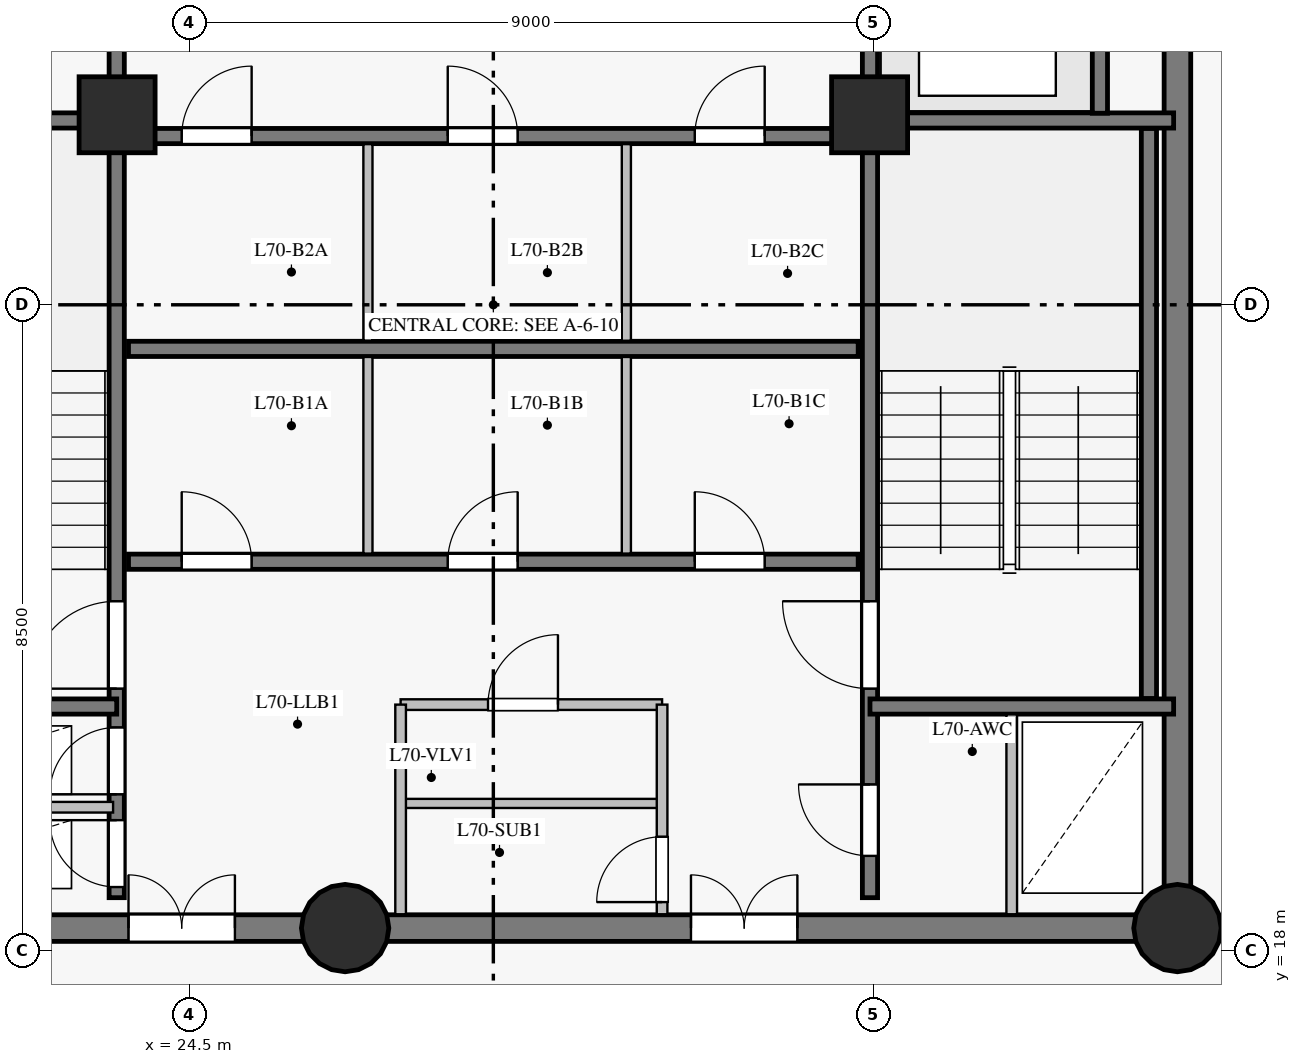
"""IFC4 building model, lengths in metres.
Left out: names, types, materials, properties, quantities, classifications, styles, units other than length and angle.
Written with IfcOpenShell. Run it as: python <this file> out.ifc"""

import sys

from ifc_helpers import new_model, si_unit, direction, frame, frame_2d, origin, origin_with_axes, origin_2d, place, context, subcontext, project, spatial, rectangle, circle, extrude, source, transform, mapped, element, fill, save


model = new_model("IFC4")
c1 = context("Model", 3, precision=1e-05, world=origin(), true_north=direction((0.0, 1.0)))
c2 = subcontext(c1, "Body", "Model", "MODEL_VIEW")
j1 = project(units=[si_unit("LENGTHUNIT", "METRE"), si_unit("PLANEANGLEUNIT", "RADIAN")], contexts=[c1])
p1 = place(None, origin())
s1 = spatial("IfcSite", under=j1, at=p1, CompositionType="ELEMENT")
p2 = place(p1, origin())
s2 = spatial("IfcBuilding", under=s1, at=p2, CompositionType="ELEMENT")
p3 = place(p2, frame((0.0, 0.0, 238.25)))
s3 = spatial("IfcBuildingStorey", under=s2, at=p3, CompositionType="ELEMENT", Elevation=238.25)
p4 = place(p3, frame((19.5, 18.3, 0.0), z_axis=(0.0, 0.0, 1.0), x_axis=(1.0, 0.0, 0.0)))
e1 = element("IfcWall", 1, at=p4, inside=s3, PredefinedType="SHEAR", context=c2, shape_type="SweptSolid", body=[
    extrude(rectangle(XDim=7.05, YDim=0.35, at=frame_2d((3.525, 0.0))), origin(), (0.0, 0.0, 1.0), 2.85),
])
p5 = place(p4, frame((4.2, 0.0, 0.0)))
e2 = element("IfcOpeningElement", 2, at=p5, cuts=e1, PredefinedType="OPENING", context=c2, shape_type="SweptSolid", body=[
    extrude(rectangle(XDim=1.4, YDim=2.2, at=frame_2d((0.7, 1.1))), frame((0.0, 0.185, 0.0), z_axis=(0.0, -1.0, 0.0), x_axis=(1.0, 0.0, 0.0)), (0.0, 0.0, 1.0), 0.37),
])
p6 = place(p3, frame((26.55, 18.3, 0.0), z_axis=(0.0, 0.0, 1.0), x_axis=(1.0, 0.0, 0.0)))
e3 = element("IfcWall", 3, at=p6, inside=s3, PredefinedType="SHEAR", context=c2, shape_type="SweptSolid", body=[
    extrude(rectangle(XDim=10.95, YDim=0.35, at=frame_2d((5.475, 0.0))), origin(), (0.0, 0.0, 1.0), 2.85),
])
p7 = place(p6, frame((4.55, 0.0, 0.0)))
e4 = element("IfcOpeningElement", 4, at=p7, cuts=e3, PredefinedType="OPENING", context=c2, shape_type="SweptSolid", body=[
    extrude(rectangle(XDim=1.4, YDim=2.2, at=frame_2d((0.7, 1.1))), frame((0.0, 0.185, 0.0), z_axis=(0.0, -1.0, 0.0), x_axis=(1.0, 0.0, 0.0)), (0.0, 0.0, 1.0), 0.37),
])
p8 = place(p3, frame((37.5, 18.3, 0.0), z_axis=(0.0, 0.0, 1.0), x_axis=(0.0, 1.0, 0.0)))
e5 = element("IfcWall", 5, at=p8, inside=s3, PredefinedType="SHEAR", context=c2, shape_type="SweptSolid", body=[
    extrude(rectangle(XDim=16.4, YDim=0.35, at=frame_2d((8.2, 0.0))), origin(), (0.0, 0.0, 1.0), 2.85),
])
p9 = place(p8, frame((13.85, 0.0, 0.0)))
e6 = element("IfcOpeningElement", 6, at=p9, cuts=e5, PredefinedType="OPENING", context=c2, shape_type="SweptSolid", body=[
    extrude(rectangle(XDim=1.2, YDim=2.15, at=frame_2d((0.6, 1.075))), frame((0.0, 0.185, 0.0), z_axis=(0.0, -1.0, 0.0), x_axis=(1.0, 0.0, 0.0)), (0.0, 0.0, 1.0), 0.37),
])
m1 = source(origin_with_axes(), c2, "Body", "SweptSolid", [
    extrude(circle(Radius=0.575, at=origin_2d()), origin(), (0.0, 0.0, 1.0), 3.05),
])
for number, where, z_axis, x_axis in (
    (7, (26.55, 18.3, 0.0), (0.0, 0.0, 1.0), (1.0, 0.0, 0.0)),
    (8, (37.5, 18.3, 0.0), (0.0, 0.0, 1.0), (1.0, 0.0, 0.0)),
):
    element("IfcColumn", number, at=place(p3, frame(where, z_axis=z_axis, x_axis=x_axis)), inside=s3, PredefinedType="COLUMN", context=c2, shape_type="MappedRepresentation", body=[
        mapped(m1, transform((0.0, 0.0, 0.0), scale=1.0)),
    ])
m2 = source(origin_with_axes(), c2, "Body", "SweptSolid", [
    extrude(rectangle(XDim=1.0, YDim=1.0, at=origin_2d()), origin(), (0.0, 0.0, 1.0), 3.05),
])
for number, where, z_axis, x_axis in (
    (9, (23.55, 29.0, 0.0), (0.0, 0.0, 1.0), (1.0, 0.0, 0.0)),
    (10, (33.45, 29.0, 0.0), (0.0, 0.0, 1.0), (1.0, 0.0, 0.0)),
):
    element("IfcColumn", number, at=place(p3, frame(where, z_axis=z_axis, x_axis=x_axis)), inside=s3, PredefinedType="COLUMN", context=c2, shape_type="MappedRepresentation", body=[
        mapped(m2, transform((0.0, 0.0, 0.0), scale=1.0)),
    ])
p10 = place(p3, frame((23.545, 18.7, 0.0), z_axis=(0.0, 0.0, 1.0), x_axis=(0.0, 1.0, 0.0)))
e11 = element("IfcWall", 11, at=p10, inside=s3, PredefinedType="SHEAR", context=c2, shape_type="SweptSolid", body=[
    extrude(rectangle(XDim=15.6, YDim=0.2, at=frame_2d((7.8, 0.0))), origin(), (0.0, 0.0, 1.0), 2.85),
])
p11 = place(p10, frame((2.75, 0.0, 0.0)))
e12 = element("IfcOpeningElement", 12, at=p11, cuts=e11, PredefinedType="OPENING", context=c2, shape_type="SweptSolid", body=[
    extrude(rectangle(XDim=1.15, YDim=2.15, at=frame_2d((0.575, 1.075))), frame((0.0, 0.11, 0.0), z_axis=(0.0, -1.0, 0.0), x_axis=(1.0, 0.0, 0.0)), (0.0, 0.0, 1.0), 0.22),
])
p12 = place(p10, frame((0.14, 0.0, 0.0)))
e13 = element("IfcOpeningElement", 13, at=p12, cuts=e11, PredefinedType="OPENING", context=c2, shape_type="SweptSolid", body=[
    extrude(rectangle(XDim=0.88, YDim=2.1, at=frame_2d((0.44, 1.05))), frame((0.0, 0.11, 0.0), z_axis=(0.0, -1.0, 0.0), x_axis=(1.0, 0.0, 0.0)), (0.0, 0.0, 1.0), 0.22),
])
p13 = place(p10, frame((1.36, 0.0, 0.0)))
e14 = element("IfcOpeningElement", 14, at=p13, cuts=e11, PredefinedType="OPENING", context=c2, shape_type="SweptSolid", body=[
    extrude(rectangle(XDim=0.88, YDim=2.1, at=frame_2d((0.44, 1.05))), frame((0.0, 0.11, 0.0), z_axis=(0.0, -1.0, 0.0), x_axis=(1.0, 0.0, 0.0)), (0.0, 0.0, 1.0), 0.22),
])
p14 = place(p10, frame((12.1, 0.0, 0.0)))
e15 = element("IfcOpeningElement", 15, at=p14, cuts=e11, PredefinedType="OPENING", context=c2, shape_type="SweptSolid", body=[
    extrude(rectangle(XDim=1.12, YDim=2.15, at=frame_2d((0.56, 1.075))), frame((0.0, 0.11, 0.0), z_axis=(0.0, -1.0, 0.0), x_axis=(1.0, 0.0, 0.0)), (0.0, 0.0, 1.0), 0.22),
])
p15 = place(p10, frame((14.05, 0.0, 0.0)))
e16 = element("IfcOpeningElement", 16, at=p15, cuts=e11, PredefinedType="OPENING", context=c2, shape_type="SweptSolid", body=[
    extrude(rectangle(XDim=1.12, YDim=2.15, at=frame_2d((0.56, 1.075))), frame((0.0, 0.11, 0.0), z_axis=(0.0, -1.0, 0.0), x_axis=(1.0, 0.0, 0.0)), (0.0, 0.0, 1.0), 0.22),
])
p16 = place(p3, frame((33.455, 18.7, 0.0), z_axis=(0.0, 0.0, 1.0), x_axis=(0.0, 1.0, 0.0)))
e17 = element("IfcWall", 17, at=p16, inside=s3, PredefinedType="SHEAR", context=c2, shape_type="SweptSolid", body=[
    extrude(rectangle(XDim=15.6, YDim=0.2, at=frame_2d((7.8, 0.0))), origin(), (0.0, 0.0, 1.0), 2.85),
])
p17 = place(p16, frame((2.75, 0.0, 0.0)))
e18 = element("IfcOpeningElement", 18, at=p17, cuts=e17, PredefinedType="OPENING", context=c2, shape_type="SweptSolid", body=[
    extrude(rectangle(XDim=1.15, YDim=2.15, at=frame_2d((0.575, 1.075))), frame((0.0, 0.11, 0.0), z_axis=(0.0, -1.0, 0.0), x_axis=(1.0, 0.0, 0.0)), (0.0, 0.0, 1.0), 0.22),
])
p18 = place(p16, frame((0.55, 0.0, 0.0)))
e19 = element("IfcOpeningElement", 19, at=p18, cuts=e17, PredefinedType="OPENING", context=c2, shape_type="SweptSolid", body=[
    extrude(rectangle(XDim=0.94, YDim=2.1, at=frame_2d((0.47, 1.05))), frame((0.0, 0.11, 0.0), z_axis=(0.0, -1.0, 0.0), x_axis=(1.0, 0.0, 0.0)), (0.0, 0.0, 1.0), 0.22),
])
p19 = place(p3, frame((23.7, 23.12, 0.0), z_axis=(0.0, 0.0, 1.0), x_axis=(1.0, 0.0, 0.0)))
e20 = element("IfcWall", 20, at=p19, inside=s3, PredefinedType="SHEAR", context=c2, shape_type="SweptSolid", body=[
    extrude(rectangle(XDim=9.6, YDim=0.2, at=frame_2d((4.8, 0.0))), origin(), (0.0, 0.0, 1.0), 2.85),
])
p20 = place(p19, frame((0.7, 0.0, 0.0)))
e21 = element("IfcOpeningElement", 21, at=p20, cuts=e20, PredefinedType="OPENING", context=c2, shape_type="SweptSolid", body=[
    extrude(rectangle(XDim=0.92, YDim=2.1, at=frame_2d((0.46, 1.05))), frame((0.0, 0.11, 0.0), z_axis=(0.0, -1.0, 0.0), x_axis=(1.0, 0.0, 0.0)), (0.0, 0.0, 1.0), 0.22),
])
p21 = place(p19, frame((4.2, 0.0, 0.0)))
e22 = element("IfcOpeningElement", 22, at=p21, cuts=e20, PredefinedType="OPENING", context=c2, shape_type="SweptSolid", body=[
    extrude(rectangle(XDim=0.92, YDim=2.1, at=frame_2d((0.46, 1.05))), frame((0.0, 0.11, 0.0), z_axis=(0.0, -1.0, 0.0), x_axis=(1.0, 0.0, 0.0)), (0.0, 0.0, 1.0), 0.22),
])
p22 = place(p19, frame((7.45, 0.0, 0.0)))
e23 = element("IfcOpeningElement", 23, at=p22, cuts=e20, PredefinedType="OPENING", context=c2, shape_type="SweptSolid", body=[
    extrude(rectangle(XDim=0.92, YDim=2.1, at=frame_2d((0.46, 1.05))), frame((0.0, 0.11, 0.0), z_axis=(0.0, -1.0, 0.0), x_axis=(1.0, 0.0, 0.0)), (0.0, 0.0, 1.0), 0.22),
])
p23 = place(p3, frame((23.7, 25.92, 0.0), z_axis=(0.0, 0.0, 1.0), x_axis=(1.0, 0.0, 0.0)))
e24 = element("IfcWall", 24, at=p23, inside=s3, PredefinedType="SHEAR", context=c2, shape_type="SweptSolid", body=[
    extrude(rectangle(XDim=9.6, YDim=0.2, at=frame_2d((4.8, 0.0))), origin(), (0.0, 0.0, 1.0), 2.85),
])
p24 = place(p3, frame((23.7, 28.72, 0.0), z_axis=(0.0, 0.0, 1.0), x_axis=(1.0, 0.0, 0.0)))
e25 = element("IfcWall", 25, at=p24, inside=s3, PredefinedType="SHEAR", context=c2, shape_type="SweptSolid", body=[
    extrude(rectangle(XDim=9.6, YDim=0.2, at=frame_2d((4.8, 0.0))), origin(), (0.0, 0.0, 1.0), 2.85),
])
p25 = place(p24, frame((0.7, 0.0, 0.0)))
e26 = element("IfcOpeningElement", 26, at=p25, cuts=e25, PredefinedType="OPENING", context=c2, shape_type="SweptSolid", body=[
    extrude(rectangle(XDim=0.92, YDim=2.1, at=frame_2d((0.46, 1.05))), frame((0.0, 0.11, 0.0), z_axis=(0.0, -1.0, 0.0), x_axis=(1.0, 0.0, 0.0)), (0.0, 0.0, 1.0), 0.22),
])
p26 = place(p24, frame((4.2, 0.0, 0.0)))
e27 = element("IfcOpeningElement", 27, at=p26, cuts=e25, PredefinedType="OPENING", context=c2, shape_type="SweptSolid", body=[
    extrude(rectangle(XDim=0.92, YDim=2.1, at=frame_2d((0.46, 1.05))), frame((0.0, 0.11, 0.0), z_axis=(0.0, -1.0, 0.0), x_axis=(1.0, 0.0, 0.0)), (0.0, 0.0, 1.0), 0.22),
])
p27 = place(p24, frame((7.45, 0.0, 0.0)))
e28 = element("IfcOpeningElement", 28, at=p27, cuts=e25, PredefinedType="OPENING", context=c2, shape_type="SweptSolid", body=[
    extrude(rectangle(XDim=0.92, YDim=2.1, at=frame_2d((0.46, 1.05))), frame((0.0, 0.11, 0.0), z_axis=(0.0, -1.0, 0.0), x_axis=(1.0, 0.0, 0.0)), (0.0, 0.0, 1.0), 0.22),
])
p28 = place(p3, frame((37.125, 21.32, 0.0), z_axis=(0.0, 0.0, 1.0), x_axis=(0.0, 1.0, 0.0)))
e29 = element("IfcWall", 29, at=p28, inside=s3, PredefinedType="SHEAR", context=c2, shape_type="SweptSolid", body=[
    extrude(rectangle(XDim=7.5, YDim=0.2, at=frame_2d((3.75, 0.0))), origin(), (0.0, 0.0, 1.0), 2.85),
])
for number, where, z_axis, x_axis in (
    (30, (33.455, 21.215, 0.0), (0.0, 0.0, 1.0), (1.0, 0.0, 0.0)),
    (31, (33.455, 28.925, 0.0), (0.0, 0.0, 1.0), (1.0, 0.0, 0.0)),
    (32, (19.55, 21.215, 0.0), (0.0, 0.0, 1.0), (1.0, 0.0, 0.0)),
    (33, (19.55, 28.925, 0.0), (0.0, 0.0, 1.0), (1.0, 0.0, 0.0)),
):
    element("IfcWall", number, at=place(p3, frame(where, z_axis=z_axis, x_axis=x_axis)), inside=s3, PredefinedType="SHEAR", context=c2, shape_type="SweptSolid", body=[
        extrude(rectangle(XDim=3.995, YDim=0.2, at=frame_2d((1.998, 0.0))), origin(), (0.0, 0.0, 1.0), 2.85),
    ])
p29 = place(p3, frame((36.48, 29.02, 0.0), z_axis=(0.0, 0.0, 1.0), x_axis=(0.0, 1.0, 0.0)))
e34 = element("IfcWall", 34, at=p29, inside=s3, PredefinedType="SHEAR", context=c2, shape_type="SweptSolid", body=[
    extrude(rectangle(XDim=2.86, YDim=0.2, at=frame_2d((1.43, 0.0))), origin(), (0.0, 0.0, 1.0), 2.85),
])
p30 = place(p3, frame((19.682, 19.89, 0.0), z_axis=(0.0, 0.0, 1.0), x_axis=(1.0, 0.0, 0.0)))
e35 = element("IfcWall", 35, at=p30, inside=s3, PredefinedType="PARTITIONING", context=c2, shape_type="SweptSolid", body=[
    extrude(rectangle(XDim=3.815, YDim=0.14, at=frame_2d((1.908, 0.0))), origin(), (0.0, 0.0, 1.0), 2.85),
])
p31 = place(p3, frame((27.28, 21.24, 0.0), z_axis=(0.0, 0.0, 1.0), x_axis=(1.0, 0.0, 0.0)))
e36 = element("IfcWall", 36, at=p31, inside=s3, PredefinedType="PARTITIONING", context=c2, shape_type="SweptSolid", body=[
    extrude(rectangle(XDim=3.44, YDim=0.14, at=frame_2d((1.72, 0.0))), origin(), (0.0, 0.0, 1.0), 2.85),
])
p32 = place(p31, frame((1.15, 0.0, 0.0)))
e37 = element("IfcOpeningElement", 37, at=p32, cuts=e36, PredefinedType="OPENING", context=c2, shape_type="SweptSolid", body=[
    extrude(rectangle(XDim=0.92, YDim=2.1, at=frame_2d((0.46, 1.05))), frame((0.0, 0.08, 0.0), z_axis=(0.0, -1.0, 0.0), x_axis=(1.0, 0.0, 0.0)), (0.0, 0.0, 1.0), 0.16),
])
p33 = place(p3, frame((27.28, 19.94, 0.0), z_axis=(0.0, 0.0, 1.0), x_axis=(1.0, 0.0, 0.0)))
e38 = element("IfcWall", 38, at=p33, inside=s3, PredefinedType="PARTITIONING", context=c2, shape_type="SweptSolid", body=[
    extrude(rectangle(XDim=3.44, YDim=0.12, at=frame_2d((1.72, 0.0))), origin(), (0.0, 0.0, 1.0), 2.85),
])
p34 = place(p3, frame((27.28, 18.482, 0.0), z_axis=(0.0, 0.0, 1.0), x_axis=(0.0, 1.0, 0.0)))
e39 = element("IfcWall", 39, at=p34, inside=s3, PredefinedType="PARTITIONING", context=c2, shape_type="SweptSolid", body=[
    extrude(rectangle(XDim=2.758, YDim=0.14, at=frame_2d((1.379, 0.0))), origin(), (0.0, 0.0, 1.0), 2.85),
])
p35 = place(p3, frame((30.72, 18.482, 0.0), z_axis=(0.0, 0.0, 1.0), x_axis=(0.0, 1.0, 0.0)))
e40 = element("IfcWall", 40, at=p35, inside=s3, PredefinedType="PARTITIONING", context=c2, shape_type="SweptSolid", body=[
    extrude(rectangle(XDim=2.758, YDim=0.14, at=frame_2d((1.379, 0.0))), origin(), (0.0, 0.0, 1.0), 2.85),
])
p36 = place(p35, frame((0.16, 0.0, 0.0)))
e41 = element("IfcOpeningElement", 41, at=p36, cuts=e40, PredefinedType="OPENING", context=c2, shape_type="SweptSolid", body=[
    extrude(rectangle(XDim=0.86, YDim=2.1, at=frame_2d((0.43, 1.05))), frame((0.0, 0.08, 0.0), z_axis=(0.0, -1.0, 0.0), x_axis=(1.0, 0.0, 0.0)), (0.0, 0.0, 1.0), 0.16),
])
for number, where, z_axis, x_axis in (
    (42, (26.85, 23.227, 0.0), (0.0, 0.0, 1.0), (0.0, 1.0, 0.0)),
    (43, (30.25, 23.227, 0.0), (0.0, 0.0, 1.0), (0.0, 1.0, 0.0)),
    (44, (26.85, 26.027, 0.0), (0.0, 0.0, 1.0), (0.0, 1.0, 0.0)),
    (45, (30.25, 26.027, 0.0), (0.0, 0.0, 1.0), (0.0, 1.0, 0.0)),
):
    element("IfcWall", number, at=place(p3, frame(where, z_axis=z_axis, x_axis=x_axis)), inside=s3, PredefinedType="PARTITIONING", context=c2, shape_type="SweptSolid", body=[
        extrude(rectangle(XDim=2.587, YDim=0.12, at=frame_2d((1.293, 0.0))), origin(), (0.0, 0.0, 1.0), 2.85),
    ])
p37 = place(p3, frame((35.32, 18.482, 0.0), z_axis=(0.0, 0.0, 1.0), x_axis=(0.0, 1.0, 0.0)))
e46 = element("IfcWall", 46, at=p37, inside=s3, PredefinedType="PARTITIONING", context=c2, shape_type="SweptSolid", body=[
    extrude(rectangle(XDim=2.629, YDim=0.14, at=frame_2d((1.314, 0.0))), origin(), (0.0, 0.0, 1.0), 2.85),
])
m3 = source(origin_with_axes(), c2, "Body", "SweptSolid", [
    extrude(rectangle(XDim=1.15, YDim=2.15, at=frame_2d((0.575, 1.075))), frame((0.0, 0.025, 0.0), z_axis=(0.0, -1.0, 0.0), x_axis=(1.0, 0.0, 0.0)), (0.0, 0.0, 1.0), 0.05),
])
p38 = place(p11, origin())
e47 = element("IfcDoor", 47, at=p38, inside=s3, OperationType="SINGLE_SWING_LEFT", PredefinedType="DOOR", context=c2, shape_type="MappedRepresentation", body=[
    mapped(m3, transform((0.0, 0.0, 0.0), scale=1.0)),
])
fill(e12, e47)
p39 = place(p17, origin())
e48 = element("IfcDoor", 48, at=p39, inside=s3, OperationType="SINGLE_SWING_RIGHT", PredefinedType="DOOR", context=c2, shape_type="MappedRepresentation", body=[
    mapped(m3, transform((0.0, 0.0, 0.0), scale=1.0)),
])
fill(e18, e48)
m4 = source(origin_with_axes(), c2, "Body", "SweptSolid", [
    extrude(rectangle(XDim=0.88, YDim=2.1, at=frame_2d((0.44, 1.05))), frame((0.0, 0.025, 0.0), z_axis=(0.0, -1.0, 0.0), x_axis=(1.0, 0.0, 0.0)), (0.0, 0.0, 1.0), 0.05),
])
p40 = place(p12, origin())
e49 = element("IfcDoor", 49, at=p40, inside=s3, OperationType="SINGLE_SWING_RIGHT", PredefinedType="DOOR", context=c2, shape_type="MappedRepresentation", body=[
    mapped(m4, transform((0.0, 0.0, 0.0), scale=1.0)),
])
fill(e13, e49)
p41 = place(p13, origin())
e50 = element("IfcDoor", 50, at=p41, inside=s3, OperationType="SINGLE_SWING_LEFT", PredefinedType="DOOR", context=c2, shape_type="MappedRepresentation", body=[
    mapped(m4, transform((0.0, 0.0, 0.0), scale=1.0)),
])
fill(e14, e50)
m5 = source(origin_with_axes(), c2, "Body", "SweptSolid", [
    extrude(rectangle(XDim=1.4, YDim=2.2, at=frame_2d((0.7, 1.1))), frame((0.0, 0.025, 0.0), z_axis=(0.0, -1.0, 0.0), x_axis=(1.0, 0.0, 0.0)), (0.0, 0.0, 1.0), 0.05),
])
p42 = place(p5, origin())
e51 = element("IfcDoor", 51, at=p42, inside=s3, OperationType="DOUBLE_DOOR_SINGLE_SWING", PredefinedType="DOOR", context=c2, shape_type="MappedRepresentation", body=[
    mapped(m5, transform((0.0, 0.0, 0.0), scale=1.0)),
])
fill(e2, e51)
p43 = place(p7, origin())
e52 = element("IfcDoor", 52, at=p43, inside=s3, OperationType="DOUBLE_DOOR_SINGLE_SWING", PredefinedType="DOOR", context=c2, shape_type="MappedRepresentation", body=[
    mapped(m5, transform((0.0, 0.0, 0.0), scale=1.0)),
])
fill(e4, e52)
m6 = source(origin_with_axes(), c2, "Body", "SweptSolid", [
    extrude(rectangle(XDim=0.94, YDim=2.1, at=frame_2d((0.47, 1.05))), frame((0.0, 0.025, 0.0), z_axis=(0.0, -1.0, 0.0), x_axis=(1.0, 0.0, 0.0)), (0.0, 0.0, 1.0), 0.05),
])
p44 = place(p18, origin())
e53 = element("IfcDoor", 53, at=p44, inside=s3, OperationType="SINGLE_SWING_RIGHT", PredefinedType="DOOR", context=c2, shape_type="MappedRepresentation", body=[
    mapped(m6, transform((0.0, 0.0, 0.0), scale=1.0)),
])
fill(e19, e53)
m7 = source(origin_with_axes(), c2, "Body", "SweptSolid", [
    extrude(rectangle(XDim=0.86, YDim=2.1, at=frame_2d((0.43, 1.05))), frame((0.0, 0.025, 0.0), z_axis=(0.0, -1.0, 0.0), x_axis=(1.0, 0.0, 0.0)), (0.0, 0.0, 1.0), 0.05),
])
p45 = place(p36, origin())
e54 = element("IfcDoor", 54, at=p45, inside=s3, OperationType="SINGLE_SWING_LEFT", PredefinedType="DOOR", context=c2, shape_type="MappedRepresentation", body=[
    mapped(m7, transform((0.0, 0.0, 0.0), scale=1.0)),
])
fill(e41, e54)
m8 = source(origin_with_axes(), c2, "Body", "SweptSolid", [
    extrude(rectangle(XDim=0.92, YDim=2.1, at=frame_2d((0.46, 1.05))), frame((0.0, 0.025, 0.0), z_axis=(0.0, -1.0, 0.0), x_axis=(1.0, 0.0, 0.0)), (0.0, 0.0, 1.0), 0.05),
])
p46 = place(p32, origin())
e55 = element("IfcDoor", 55, at=p46, inside=s3, OperationType="SINGLE_SWING_RIGHT", PredefinedType="DOOR", context=c2, shape_type="MappedRepresentation", body=[
    mapped(m8, transform((0.0, 0.0, 0.0), scale=1.0)),
])
fill(e37, e55)
p47 = place(p20, origin())
e56 = element("IfcDoor", 56, at=p47, inside=s3, OperationType="SINGLE_SWING_LEFT", PredefinedType="DOOR", context=c2, shape_type="MappedRepresentation", body=[
    mapped(m8, transform((0.0, 0.0, 0.0), scale=1.0)),
])
fill(e21, e56)
p48 = place(p21, origin())
e57 = element("IfcDoor", 57, at=p48, inside=s3, OperationType="SINGLE_SWING_RIGHT", PredefinedType="DOOR", context=c2, shape_type="MappedRepresentation", body=[
    mapped(m8, transform((0.0, 0.0, 0.0), scale=1.0)),
])
fill(e22, e57)
p49 = place(p22, origin())
e58 = element("IfcDoor", 58, at=p49, inside=s3, OperationType="SINGLE_SWING_LEFT", PredefinedType="DOOR", context=c2, shape_type="MappedRepresentation", body=[
    mapped(m8, transform((0.0, 0.0, 0.0), scale=1.0)),
])
fill(e23, e58)
p50 = place(p25, origin())
e59 = element("IfcDoor", 59, at=p50, inside=s3, OperationType="SINGLE_SWING_RIGHT", PredefinedType="DOOR", context=c2, shape_type="MappedRepresentation", body=[
    mapped(m8, transform((0.0, 0.0, 0.0), scale=1.0)),
])
fill(e26, e59)
p51 = place(p26, origin())
e60 = element("IfcDoor", 60, at=p51, inside=s3, OperationType="SINGLE_SWING_LEFT", PredefinedType="DOOR", context=c2, shape_type="MappedRepresentation", body=[
    mapped(m8, transform((0.0, 0.0, 0.0), scale=1.0)),
])
fill(e27, e60)
p52 = place(p27, origin())
e61 = element("IfcDoor", 61, at=p52, inside=s3, OperationType="SINGLE_SWING_RIGHT", PredefinedType="DOOR", context=c2, shape_type="MappedRepresentation", body=[
    mapped(m8, transform((0.0, 0.0, 0.0), scale=1.0)),
])
fill(e28, e61)
save(model, sys.argv[1])
